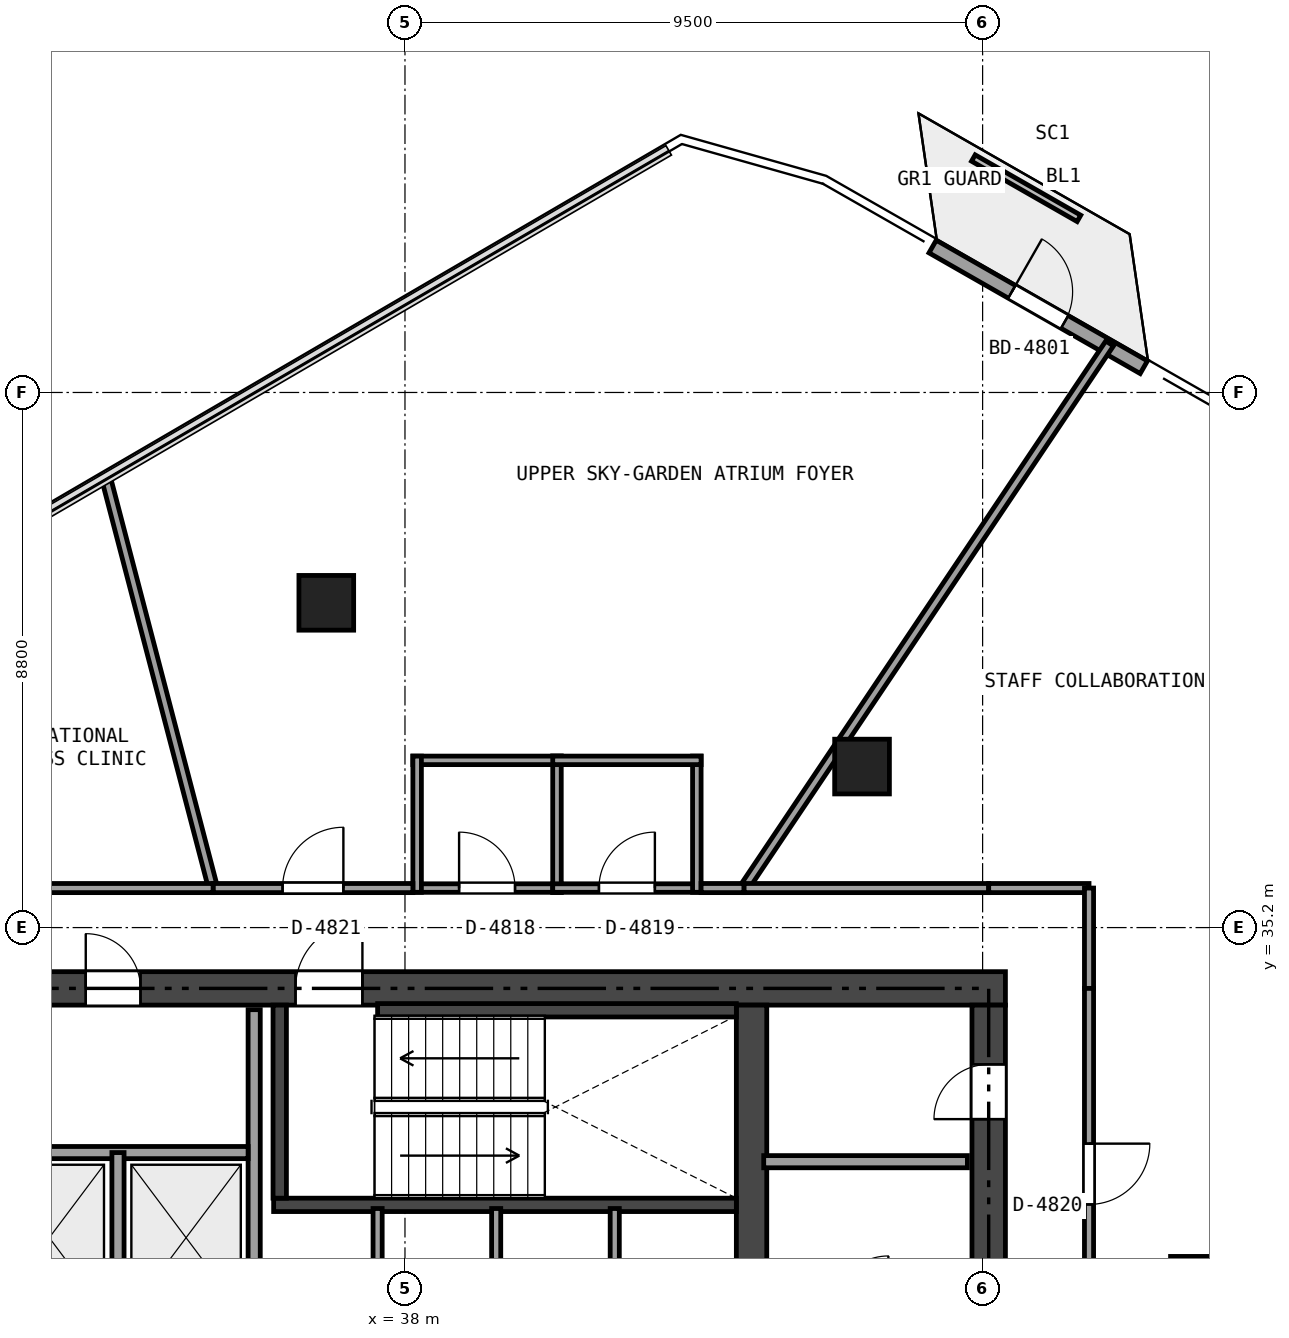
"""IFC4 building model, lengths in metres.
Left out: names, types, materials, properties, quantities, classifications, styles, units other than length and angle.
Written with IfcOpenShell. Run it as: python <this file> out.ifc"""

import sys

from ifc_helpers import new_model, si_unit, direction, frame, frame_2d, origin, origin_2d, place, context, subcontext, project, spatial, rectangle, extrude, element, fill, save


model = new_model("IFC4")
c1 = context("Model", 3, precision=1e-05, world=origin(), true_north=direction((0.0, 1.0)))
c2 = subcontext(c1, "Body", "Model", "MODEL_VIEW")
j1 = project(units=[si_unit("LENGTHUNIT", "METRE"), si_unit("PLANEANGLEUNIT", "RADIAN")], contexts=[c1])
p1 = place(None, origin())
s1 = spatial("IfcSite", under=j1, at=p1, CompositionType="ELEMENT")
p2 = place(p1, origin())
s2 = spatial("IfcBuilding", under=s1, at=p2, CompositionType="ELEMENT")
p3 = place(p2, frame((0.0, 0.0, 180.6)))
s3 = spatial("IfcBuildingStorey", under=s2, at=p3, CompositionType="ELEMENT", Elevation=180.6)
p4 = place(p3, frame((26.525, 34.2, 0.0), z_axis=(0.0, 0.0, 1.0), x_axis=(1.0, 0.0, 0.0)))
e1 = element("IfcWall", 1, at=p4, inside=s3, PredefinedType="SHEAR", context=c2, shape_type="SweptSolid", body=[
    extrude(rectangle(XDim=21.35, YDim=0.55, at=frame_2d((10.675, 0.0))), origin(), (0.0, 0.0, 1.0), 3.32),
])
p5 = place(p4, frame((9.675, 0.0, 0.0)))
e2 = element("IfcOpeningElement", 2, at=p5, cuts=e1, PredefinedType="OPENING", context=c2, shape_type="SweptSolid", body=[
    extrude(rectangle(XDim=1.1, YDim=2.15, at=frame_2d((0.55, 1.075))), frame((0.0, 0.285, 0.0), z_axis=(0.0, -1.0, 0.0), x_axis=(1.0, 0.0, 0.0)), (0.0, 0.0, 1.0), 0.57),
])
p6 = place(p4, frame((1.925, 0.0, 0.0)))
e3 = element("IfcOpeningElement", 3, at=p6, cuts=e1, PredefinedType="OPENING", context=c2, shape_type="SweptSolid", body=[
    extrude(rectangle(XDim=0.9, YDim=2.1, at=frame_2d((0.45, 1.05))), frame((0.0, 0.285, 0.0), z_axis=(0.0, -1.0, 0.0), x_axis=(1.0, 0.0, 0.0)), (0.0, 0.0, 1.0), 0.57),
])
p7 = place(p4, frame((6.225, 0.0, 0.0)))
e4 = element("IfcOpeningElement", 4, at=p7, cuts=e1, PredefinedType="OPENING", context=c2, shape_type="SweptSolid", body=[
    extrude(rectangle(XDim=0.9, YDim=2.1, at=frame_2d((0.45, 1.05))), frame((0.0, 0.285, 0.0), z_axis=(0.0, -1.0, 0.0), x_axis=(1.0, 0.0, 0.0)), (0.0, 0.0, 1.0), 0.57),
])
p8 = place(p3, frame((47.6, 18.875, 0.0), z_axis=(0.0, 0.0, 1.0), x_axis=(0.0, 1.0, 0.0)))
e5 = element("IfcWall", 5, at=p8, inside=s3, PredefinedType="SHEAR", context=c2, shape_type="SweptSolid", body=[
    extrude(rectangle(XDim=15.05, YDim=0.55, at=frame_2d((7.525, 0.0))), origin(), (0.0, 0.0, 1.0), 3.32),
])
p9 = place(p8, frame((6.625, 0.0, 0.0)))
e6 = element("IfcOpeningElement", 6, at=p9, cuts=e5, PredefinedType="OPENING", context=c2, shape_type="SweptSolid", body=[
    extrude(rectangle(XDim=1.1, YDim=2.15, at=frame_2d((0.55, 1.075))), frame((0.0, 0.285, 0.0), z_axis=(0.0, -1.0, 0.0), x_axis=(1.0, 0.0, 0.0)), (0.0, 0.0, 1.0), 0.57),
])
p10 = place(p8, frame((8.525, 0.0, 0.0)))
e7 = element("IfcOpeningElement", 7, at=p10, cuts=e5, PredefinedType="OPENING", context=c2, shape_type="SweptSolid", body=[
    extrude(rectangle(XDim=0.9, YDim=2.1, at=frame_2d((0.45, 1.05))), frame((0.0, 0.285, 0.0), z_axis=(0.0, -1.0, 0.0), x_axis=(1.0, 0.0, 0.0)), (0.0, 0.0, 1.0), 0.57),
])
p11 = place(p8, frame((13.175, 0.0, 0.0)))
e8 = element("IfcOpeningElement", 8, at=p11, cuts=e5, PredefinedType="OPENING", context=c2, shape_type="SweptSolid", body=[
    extrude(rectangle(XDim=0.9, YDim=2.1, at=frame_2d((0.45, 1.05))), frame((0.0, 0.285, 0.0), z_axis=(0.0, -1.0, 0.0), x_axis=(1.0, 0.0, 0.0)), (0.0, 0.0, 1.0), 0.57),
])
p12 = place(p3, frame((43.7, 18.875, 0.0), z_axis=(0.0, 0.0, 1.0), x_axis=(0.0, 1.0, 0.0)))
e9 = element("IfcWall", 9, at=p12, inside=s3, PredefinedType="SHEAR", context=c2, shape_type="SweptSolid", body=[
    extrude(rectangle(XDim=15.05, YDim=0.5, at=frame_2d((7.525, 0.0))), origin(), (0.0, 0.0, 1.0), 3.32),
])
p13 = place(p12, frame((8.125, 0.0, 0.0)))
e10 = element("IfcOpeningElement", 10, at=p13, cuts=e9, PredefinedType="OPENING", context=c2, shape_type="SweptSolid", body=[
    extrude(rectangle(XDim=0.9, YDim=2.1, at=frame_2d((0.45, 1.05))), frame((0.0, 0.26, 0.0), z_axis=(0.0, -1.0, 0.0), x_axis=(1.0, 0.0, 0.0)), (0.0, 0.0, 1.0), 0.52),
])
p14 = place(p3, frame((35.84, 30.64, 0.0), z_axis=(0.0, 0.0, 1.0), x_axis=(1.0, 0.0, 0.0)))
e11 = element("IfcWall", 11, at=p14, inside=s3, PredefinedType="SHEAR", context=c2, shape_type="SweptSolid", body=[
    extrude(rectangle(XDim=7.61, YDim=0.22, at=frame_2d((3.805, 0.0))), origin(), (0.0, 0.0, 1.0), 3.32),
])
p15 = place(p3, frame((35.94, 30.75, 0.0), z_axis=(0.0, 0.0, 1.0), x_axis=(0.0, 1.0, 0.0)))
e12 = element("IfcWall", 12, at=p15, inside=s3, PredefinedType="SHEAR", context=c2, shape_type="SweptSolid", body=[
    extrude(rectangle(XDim=3.175, YDim=0.22, at=frame_2d((1.587, 0.0))), origin(), (0.0, 0.0, 1.0), 3.32),
])
p16 = place(p3, frame((37.55, 33.84, 0.0), z_axis=(0.0, 0.0, 1.0), x_axis=(1.0, 0.0, 0.0)))
e13 = element("IfcWall", 13, at=p16, inside=s3, PredefinedType="SHEAR", context=c2, shape_type="SweptSolid", body=[
    extrude(rectangle(XDim=5.9, YDim=0.22, at=frame_2d((2.95, 0.0))), origin(), (0.0, 0.0, 1.0), 3.32),
])
for number, where, z_axis, x_axis in (
    (14, (51.041, 29.342, 0.0), (0.0, 0.0, 1.0), (1.0, 0.0, 0.0)),
    (15, (45.517, 37.848, 0.0), (0.0, 0.0, 1.0), (1.0, 0.0, 0.0)),
    (16, (36.706, 40.541, 0.0), (0.0, 0.0, 1.0), (1.0, 0.0, 0.0)),
):
    element("IfcColumn", number, at=place(p3, frame(where, z_axis=z_axis, x_axis=x_axis)), inside=s3, PredefinedType="COLUMN", context=c2, shape_type="SweptSolid", body=[
        extrude(rectangle(XDim=0.9, YDim=0.9, at=origin_2d()), origin(), (0.0, 0.0, 1.0), 3.32),
    ])
p17 = place(p3, frame((46.678, 46.4, 0.0), z_axis=(0.0, 0.0, 1.0), x_axis=(0.868205580385, -0.496204665626, 0.0)))
e17 = element("IfcWall", 17, at=p17, inside=s3, PredefinedType="SOLIDWALL", context=c2, shape_type="SweptSolid", body=[
    extrude(rectangle(XDim=4.0, YDim=0.24, at=frame_2d((2.0, 0.0))), origin(), (0.0, 0.0, 1.0), 3.32),
])
p18 = place(p17, frame((1.5, 0.0, 0.0)))
e18 = element("IfcOpeningElement", 18, at=p18, cuts=e17, PredefinedType="OPENING", context=c2, shape_type="SweptSolid", body=[
    extrude(rectangle(XDim=1.0, YDim=2.15, at=frame_2d((0.5, 1.075))), frame((0.0, 0.13, 0.0), z_axis=(0.0, -1.0, 0.0), x_axis=(1.0, 0.0, 0.0)), (0.0, 0.0, 1.0), 0.26),
])
p19 = place(p3, frame((43.9, 31.35, 0.0), z_axis=(0.0, 0.0, 1.0), x_axis=(1.0, 0.0, 0.0)))
e19 = element("IfcWall", 19, at=p19, inside=s3, PredefinedType="SOLIDWALL", context=c2, shape_type="SweptSolid", body=[
    extrude(rectangle(XDim=3.35, YDim=0.2, at=frame_2d((1.675, 0.0))), origin(), (0.0, 0.0, 1.0), 2.949),
])
p20 = place(p3, frame((35.52, 18.95, 0.0), z_axis=(0.0, 0.0, 1.0), x_axis=(0.0, 1.0, 0.0)))
e20 = element("IfcWall", 20, at=p20, inside=s3, PredefinedType="SOLIDWALL", context=c2, shape_type="SweptSolid", body=[
    extrude(rectangle(XDim=14.9, YDim=0.2, at=frame_2d((7.45, 0.0))), origin(), (0.0, 0.0, 1.0), 2.841),
])
p21 = place(p20, frame((7.755, 0.0, 0.0)))
e21 = element("IfcOpeningElement", 21, at=p21, cuts=e20, PredefinedType="OPENING", context=c2, shape_type="SweptSolid", body=[
    extrude(rectangle(XDim=0.95, YDim=2.15, at=frame_2d((0.475, 1.075))), frame((0.0, 0.11, 0.0), z_axis=(0.0, -1.0, 0.0), x_axis=(1.0, 0.0, 0.0)), (0.0, 0.0, 1.0), 0.22),
])
p22 = place(p20, frame((0.6, 0.0, 0.0)))
e22 = element("IfcOpeningElement", 22, at=p22, cuts=e20, PredefinedType="OPENING", context=c2, shape_type="SweptSolid", body=[
    extrude(rectangle(XDim=0.9, YDim=2.1, at=frame_2d((0.45, 1.05))), frame((0.0, 0.11, 0.0), z_axis=(0.0, -1.0, 0.0), x_axis=(1.0, 0.0, 0.0)), (0.0, 0.0, 1.0), 0.22),
])
p23 = place(p3, frame((31.0, 31.5, 0.0), z_axis=(0.0, 0.0, 1.0), x_axis=(1.0, 0.0, 0.0)))
e23 = element("IfcWall", 23, at=p23, inside=s3, PredefinedType="SOLIDWALL", context=c2, shape_type="SweptSolid", body=[
    extrude(rectangle(XDim=4.42, YDim=0.2, at=frame_2d((2.21, 0.0))), origin(), (0.0, 0.0, 1.0), 3.32),
])
p24 = place(p3, frame((33.28, 28.68, 0.0), z_axis=(0.0, 0.0, 1.0), x_axis=(0.0, 1.0, 0.0)))
e24 = element("IfcWall", 24, at=p24, inside=s3, PredefinedType="SOLIDWALL", context=c2, shape_type="SweptSolid", body=[
    extrude(rectangle(XDim=2.82, YDim=0.2, at=frame_2d((1.41, 0.0))), origin(), (0.0, 0.0, 1.0), 3.32),
])
for number, where, z_axis, x_axis in (
    (25, (37.55, 28.15, 0.0), (0.0, 0.0, 1.0), (0.0, 1.0, 0.0)),
    (26, (39.5, 28.15, 0.0), (0.0, 0.0, 1.0), (0.0, 1.0, 0.0)),
    (27, (41.45, 28.15, 0.0), (0.0, 0.0, 1.0), (0.0, 1.0, 0.0)),
):
    element("IfcWall", number, at=place(p3, frame(where, z_axis=z_axis, x_axis=x_axis)), inside=s3, PredefinedType="PARTITIONING", context=c2, shape_type="SweptSolid", body=[
        extrude(rectangle(XDim=2.43, YDim=0.15, at=frame_2d((1.215, 0.0))), origin(), (0.0, 0.0, 1.0), 3.32),
    ])
p25 = place(p3, frame((38.13, 35.85, 0.0), z_axis=(0.0, 0.0, 1.0), x_axis=(1.0, 0.0, 0.0)))
e28 = element("IfcWall", 28, at=p25, inside=s3, PredefinedType="PARTITIONING", context=c2, shape_type="SweptSolid", body=[
    extrude(rectangle(XDim=2.44, YDim=0.14, at=frame_2d((1.22, 0.0))), origin(), (0.0, 0.0, 1.0), 2.841),
])
p26 = place(p25, frame((0.76, 0.0, 0.0)))
e29 = element("IfcOpeningElement", 29, at=p26, cuts=e28, PredefinedType="OPENING", context=c2, shape_type="SweptSolid", body=[
    extrude(rectangle(XDim=0.92, YDim=2.1, at=frame_2d((0.46, 1.05))), frame((0.0, 0.08, 0.0), z_axis=(0.0, -1.0, 0.0), x_axis=(1.0, 0.0, 0.0)), (0.0, 0.0, 1.0), 0.16),
])
p27 = place(p3, frame((40.5, 35.78, 0.0), z_axis=(0.0, 0.0, 1.0), x_axis=(0.0, 1.0, 0.0)))
e30 = element("IfcWall", 30, at=p27, inside=s3, PredefinedType="PARTITIONING", context=c2, shape_type="SweptSolid", body=[
    extrude(rectangle(XDim=2.24, YDim=0.14, at=frame_2d((1.12, 0.0))), origin(), (0.0, 0.0, 1.0), 2.949),
])
p28 = place(p3, frame((40.57, 37.95, 0.0), z_axis=(0.0, 0.0, 1.0), x_axis=(-1.0, 0.0, 0.0)))
e31 = element("IfcWall", 31, at=p28, inside=s3, PredefinedType="PARTITIONING", context=c2, shape_type="SweptSolid", body=[
    extrude(rectangle(XDim=2.44, YDim=0.14, at=frame_2d((1.22, 0.0))), origin(), (0.0, 0.0, 1.0), 2.841),
])
p29 = place(p3, frame((38.2, 38.02, 0.0), z_axis=(0.0, 0.0, 1.0), x_axis=(0.0, -1.0, 0.0)))
e32 = element("IfcWall", 32, at=p29, inside=s3, PredefinedType="PARTITIONING", context=c2, shape_type="SweptSolid", body=[
    extrude(rectangle(XDim=2.24, YDim=0.14, at=frame_2d((1.12, 0.0))), origin(), (0.0, 0.0, 1.0), 2.949),
])
p30 = place(p3, frame((40.43, 35.85, 0.0), z_axis=(0.0, 0.0, 1.0), x_axis=(1.0, 0.0, 0.0)))
e33 = element("IfcWall", 33, at=p30, inside=s3, PredefinedType="PARTITIONING", context=c2, shape_type="SweptSolid", body=[
    extrude(rectangle(XDim=2.44, YDim=0.14, at=frame_2d((1.22, 0.0))), origin(), (0.0, 0.0, 1.0), 2.841),
])
p31 = place(p30, frame((0.76, 0.0, 0.0)))
e34 = element("IfcOpeningElement", 34, at=p31, cuts=e33, PredefinedType="OPENING", context=c2, shape_type="SweptSolid", body=[
    extrude(rectangle(XDim=0.92, YDim=2.1, at=frame_2d((0.46, 1.05))), frame((0.0, 0.08, 0.0), z_axis=(0.0, -1.0, 0.0), x_axis=(1.0, 0.0, 0.0)), (0.0, 0.0, 1.0), 0.16),
])
p32 = place(p3, frame((42.8, 35.78, 0.0), z_axis=(0.0, 0.0, 1.0), x_axis=(0.0, 1.0, 0.0)))
e35 = element("IfcWall", 35, at=p32, inside=s3, PredefinedType="PARTITIONING", context=c2, shape_type="SweptSolid", body=[
    extrude(rectangle(XDim=2.24, YDim=0.14, at=frame_2d((1.12, 0.0))), origin(), (0.0, 0.0, 1.0), 2.949),
])
p33 = place(p3, frame((42.87, 37.95, 0.0), z_axis=(0.0, 0.0, 1.0), x_axis=(-1.0, 0.0, 0.0)))
e36 = element("IfcWall", 36, at=p33, inside=s3, PredefinedType="PARTITIONING", context=c2, shape_type="SweptSolid", body=[
    extrude(rectangle(XDim=2.44, YDim=0.14, at=frame_2d((1.22, 0.0))), origin(), (0.0, 0.0, 1.0), 2.841),
])
p34 = place(p3, frame((49.589, 44.806, 0.0), z_axis=(0.0, 0.0, 1.0), x_axis=(-0.55755874388, -0.83013748688, 0.0)))
e37 = element("IfcWall", 37, at=p34, inside=s3, PredefinedType="PARTITIONING", context=c2, shape_type="SweptSolid", body=[
    extrude(rectangle(XDim=10.788, YDim=0.15, at=frame_2d((5.394, 0.0))), origin(), (0.0, 0.0, 1.0), 2.905),
])
p35 = place(p3, frame((43.574, 35.85, 0.0), z_axis=(0.0, 0.0, 1.0), x_axis=(1.0, 0.0, 0.0)))
e38 = element("IfcWall", 38, at=p35, inside=s3, PredefinedType="PARTITIONING", context=c2, shape_type="SweptSolid", body=[
    extrude(rectangle(XDim=4.026, YDim=0.15, at=frame_2d((2.013, 0.0))), origin(), (0.0, 0.0, 1.0), 2.697),
])
p36 = place(p3, frame((47.6, 35.85, 0.0), z_axis=(0.0, 0.0, 1.0), x_axis=(1.0, 0.0, 0.0)))
e39 = element("IfcWall", 39, at=p36, inside=s3, PredefinedType="PARTITIONING", context=c2, shape_type="SweptSolid", body=[
    extrude(rectangle(XDim=1.65, YDim=0.15, at=frame_2d((0.825, 0.0))), origin(), (0.0, 0.0, 1.0), 3.32),
])
p37 = place(p3, frame((49.25, 35.85, 0.0), z_axis=(0.0, 0.0, 1.0), x_axis=(0.0, -1.0, 0.0)))
e40 = element("IfcWall", 40, at=p37, inside=s3, PredefinedType="PARTITIONING", context=c2, shape_type="SweptSolid", body=[
    extrude(rectangle(XDim=1.65, YDim=0.15, at=frame_2d((0.825, 0.0))), origin(), (0.0, 0.0, 1.0), 3.32),
])
p38 = place(p3, frame((49.25, 34.2, 0.0), z_axis=(0.0, 0.0, 1.0), x_axis=(0.0, -1.0, 0.0)))
e41 = element("IfcWall", 41, at=p38, inside=s3, PredefinedType="PARTITIONING", context=c2, shape_type="SweptSolid", body=[
    extrude(rectangle(XDim=6.106, YDim=0.15, at=frame_2d((3.053, 0.0))), origin(), (0.0, 0.0, 1.0), 2.697),
])
p39 = place(p38, frame((2.553, 0.0, 0.0)))
e42 = element("IfcOpeningElement", 42, at=p39, cuts=e41, PredefinedType="OPENING", context=c2, shape_type="SweptSolid", body=[
    extrude(rectangle(XDim=1.0, YDim=2.15, at=frame_2d((0.5, 1.075))), frame((0.0, 0.085, 0.0), z_axis=(0.0, -1.0, 0.0), x_axis=(1.0, 0.0, 0.0)), (0.0, 0.0, 1.0), 0.17),
])
p40 = place(p3, frame((33.073, 42.631, 0.0), z_axis=(0.0, 0.0, 1.0), x_axis=(0.252694156197, -0.967546207384, 0.0)))
e43 = element("IfcWall", 43, at=p40, inside=s3, PredefinedType="PARTITIONING", context=c2, shape_type="SweptSolid", body=[
    extrude(rectangle(XDim=7.009, YDim=0.15, at=frame_2d((3.504, 0.0))), origin(), (0.0, 0.0, 1.0), 2.905),
])
p41 = place(p3, frame((34.844, 35.85, 0.0), z_axis=(0.0, 0.0, 1.0), x_axis=(1.0, 0.0, 0.0)))
e44 = element("IfcWall", 44, at=p41, inside=s3, PredefinedType="PARTITIONING", context=c2, shape_type="SweptSolid", body=[
    extrude(rectangle(XDim=3.286, YDim=0.15, at=frame_2d((1.643, 0.0))), origin(), (0.0, 0.0, 1.0), 2.697),
])
p42 = place(p41, frame((1.143, 0.0, 0.0)))
e45 = element("IfcOpeningElement", 45, at=p42, cuts=e44, PredefinedType="OPENING", context=c2, shape_type="SweptSolid", body=[
    extrude(rectangle(XDim=1.0, YDim=2.15, at=frame_2d((0.5, 1.075))), frame((0.0, 0.085, 0.0), z_axis=(0.0, -1.0, 0.0), x_axis=(1.0, 0.0, 0.0)), (0.0, 0.0, 1.0), 0.17),
])
p43 = place(p3, frame((42.87, 35.85, 0.0), z_axis=(0.0, 0.0, 1.0), x_axis=(1.0, 0.0, 0.0)))
e46 = element("IfcWall", 46, at=p43, inside=s3, PredefinedType="PARTITIONING", context=c2, shape_type="SweptSolid", body=[
    extrude(rectangle(XDim=0.704, YDim=0.15, at=frame_2d((0.352, 0.0))), origin(), (0.0, 0.0, 1.0), 2.949),
])
p44 = place(p3, frame((26.8, 35.85, 0.0), z_axis=(0.0, 0.0, 1.0), x_axis=(1.0, 0.0, 0.0)))
e47 = element("IfcWall", 47, at=p44, inside=s3, PredefinedType="PARTITIONING", context=c2, shape_type="SweptSolid", body=[
    extrude(rectangle(XDim=8.044, YDim=0.15, at=frame_2d((4.022, 0.0))), origin(), (0.0, 0.0, 1.0), 2.697),
])
p45 = place(p44, frame((3.522, 0.0, 0.0)))
e48 = element("IfcOpeningElement", 48, at=p45, cuts=e47, PredefinedType="OPENING", context=c2, shape_type="SweptSolid", body=[
    extrude(rectangle(XDim=1.0, YDim=2.15, at=frame_2d((0.5, 1.075))), frame((0.0, 0.085, 0.0), z_axis=(0.0, -1.0, 0.0), x_axis=(1.0, 0.0, 0.0)), (0.0, 0.0, 1.0), 0.17),
])
p46 = place(p18, origin())
e49 = element("IfcDoor", 49, at=p46, inside=s3, OperationType="SINGLE_SWING_LEFT", PredefinedType="DOOR", context=c2, shape_type="SweptSolid", body=[
    extrude(rectangle(XDim=1.0, YDim=2.15, at=frame_2d((0.5, 1.075))), frame((0.0, 0.025, 0.0), z_axis=(0.0, -1.0, 0.0), x_axis=(1.0, 0.0, 0.0)), (0.0, 0.0, 1.0), 0.05),
])
fill(e18, e49)
p47 = place(p5, origin())
e50 = element("IfcDoor", 50, at=p47, inside=s3, OperationType="SINGLE_SWING_RIGHT", PredefinedType="DOOR", context=c2, shape_type="SweptSolid", body=[
    extrude(rectangle(XDim=1.1, YDim=2.15, at=frame_2d((0.55, 1.075))), frame((0.0, 0.025, 0.0), z_axis=(0.0, -1.0, 0.0), x_axis=(1.0, 0.0, 0.0)), (0.0, 0.0, 1.0), 0.05),
])
fill(e2, e50)
p48 = place(p7, origin())
e51 = element("IfcDoor", 51, at=p48, inside=s3, OperationType="SINGLE_SWING_LEFT", PredefinedType="DOOR", context=c2, shape_type="SweptSolid", body=[
    extrude(rectangle(XDim=0.9, YDim=2.1, at=frame_2d((0.45, 1.05))), frame((0.0, 0.025, 0.0), z_axis=(0.0, -1.0, 0.0), x_axis=(1.0, 0.0, 0.0)), (0.0, 0.0, 1.0), 0.05),
])
fill(e4, e51)
p49 = place(p11, origin())
e52 = element("IfcDoor", 52, at=p49, inside=s3, OperationType="SINGLE_SWING_LEFT", PredefinedType="DOOR", context=c2, shape_type="SweptSolid", body=[
    extrude(rectangle(XDim=0.9, YDim=2.1, at=frame_2d((0.45, 1.05))), frame((0.0, 0.025, 0.0), z_axis=(0.0, -1.0, 0.0), x_axis=(1.0, 0.0, 0.0)), (0.0, 0.0, 1.0), 0.05),
])
fill(e8, e52)
p50 = place(p26, origin())
e53 = element("IfcDoor", 53, at=p50, inside=s3, OperationType="SINGLE_SWING_LEFT", PredefinedType="DOOR", context=c2, shape_type="SweptSolid", body=[
    extrude(rectangle(XDim=0.92, YDim=2.1, at=frame_2d((0.46, 1.05))), frame((0.0, 0.025, 0.0), z_axis=(0.0, -1.0, 0.0), x_axis=(1.0, 0.0, 0.0)), (0.0, 0.0, 1.0), 0.05),
])
fill(e29, e53)
p51 = place(p31, origin())
e54 = element("IfcDoor", 54, at=p51, inside=s3, OperationType="SINGLE_SWING_RIGHT", PredefinedType="DOOR", context=c2, shape_type="SweptSolid", body=[
    extrude(rectangle(XDim=0.92, YDim=2.1, at=frame_2d((0.46, 1.05))), frame((0.0, 0.025, 0.0), z_axis=(0.0, -1.0, 0.0), x_axis=(1.0, 0.0, 0.0)), (0.0, 0.0, 1.0), 0.05),
])
fill(e34, e54)
p52 = place(p39, origin())
e55 = element("IfcDoor", 55, at=p52, inside=s3, OperationType="SINGLE_SWING_LEFT", PredefinedType="DOOR", context=c2, shape_type="SweptSolid", body=[
    extrude(rectangle(XDim=1.0, YDim=2.15, at=frame_2d((0.5, 1.075))), frame((0.0, 0.025, 0.0), z_axis=(0.0, -1.0, 0.0), x_axis=(1.0, 0.0, 0.0)), (0.0, 0.0, 1.0), 0.05),
])
fill(e42, e55)
p53 = place(p42, origin())
e56 = element("IfcDoor", 56, at=p53, inside=s3, OperationType="SINGLE_SWING_RIGHT", PredefinedType="DOOR", context=c2, shape_type="SweptSolid", body=[
    extrude(rectangle(XDim=1.0, YDim=2.15, at=frame_2d((0.5, 1.075))), frame((0.0, 0.025, 0.0), z_axis=(0.0, -1.0, 0.0), x_axis=(1.0, 0.0, 0.0)), (0.0, 0.0, 1.0), 0.05),
])
fill(e45, e56)
save(model, sys.argv[1])
